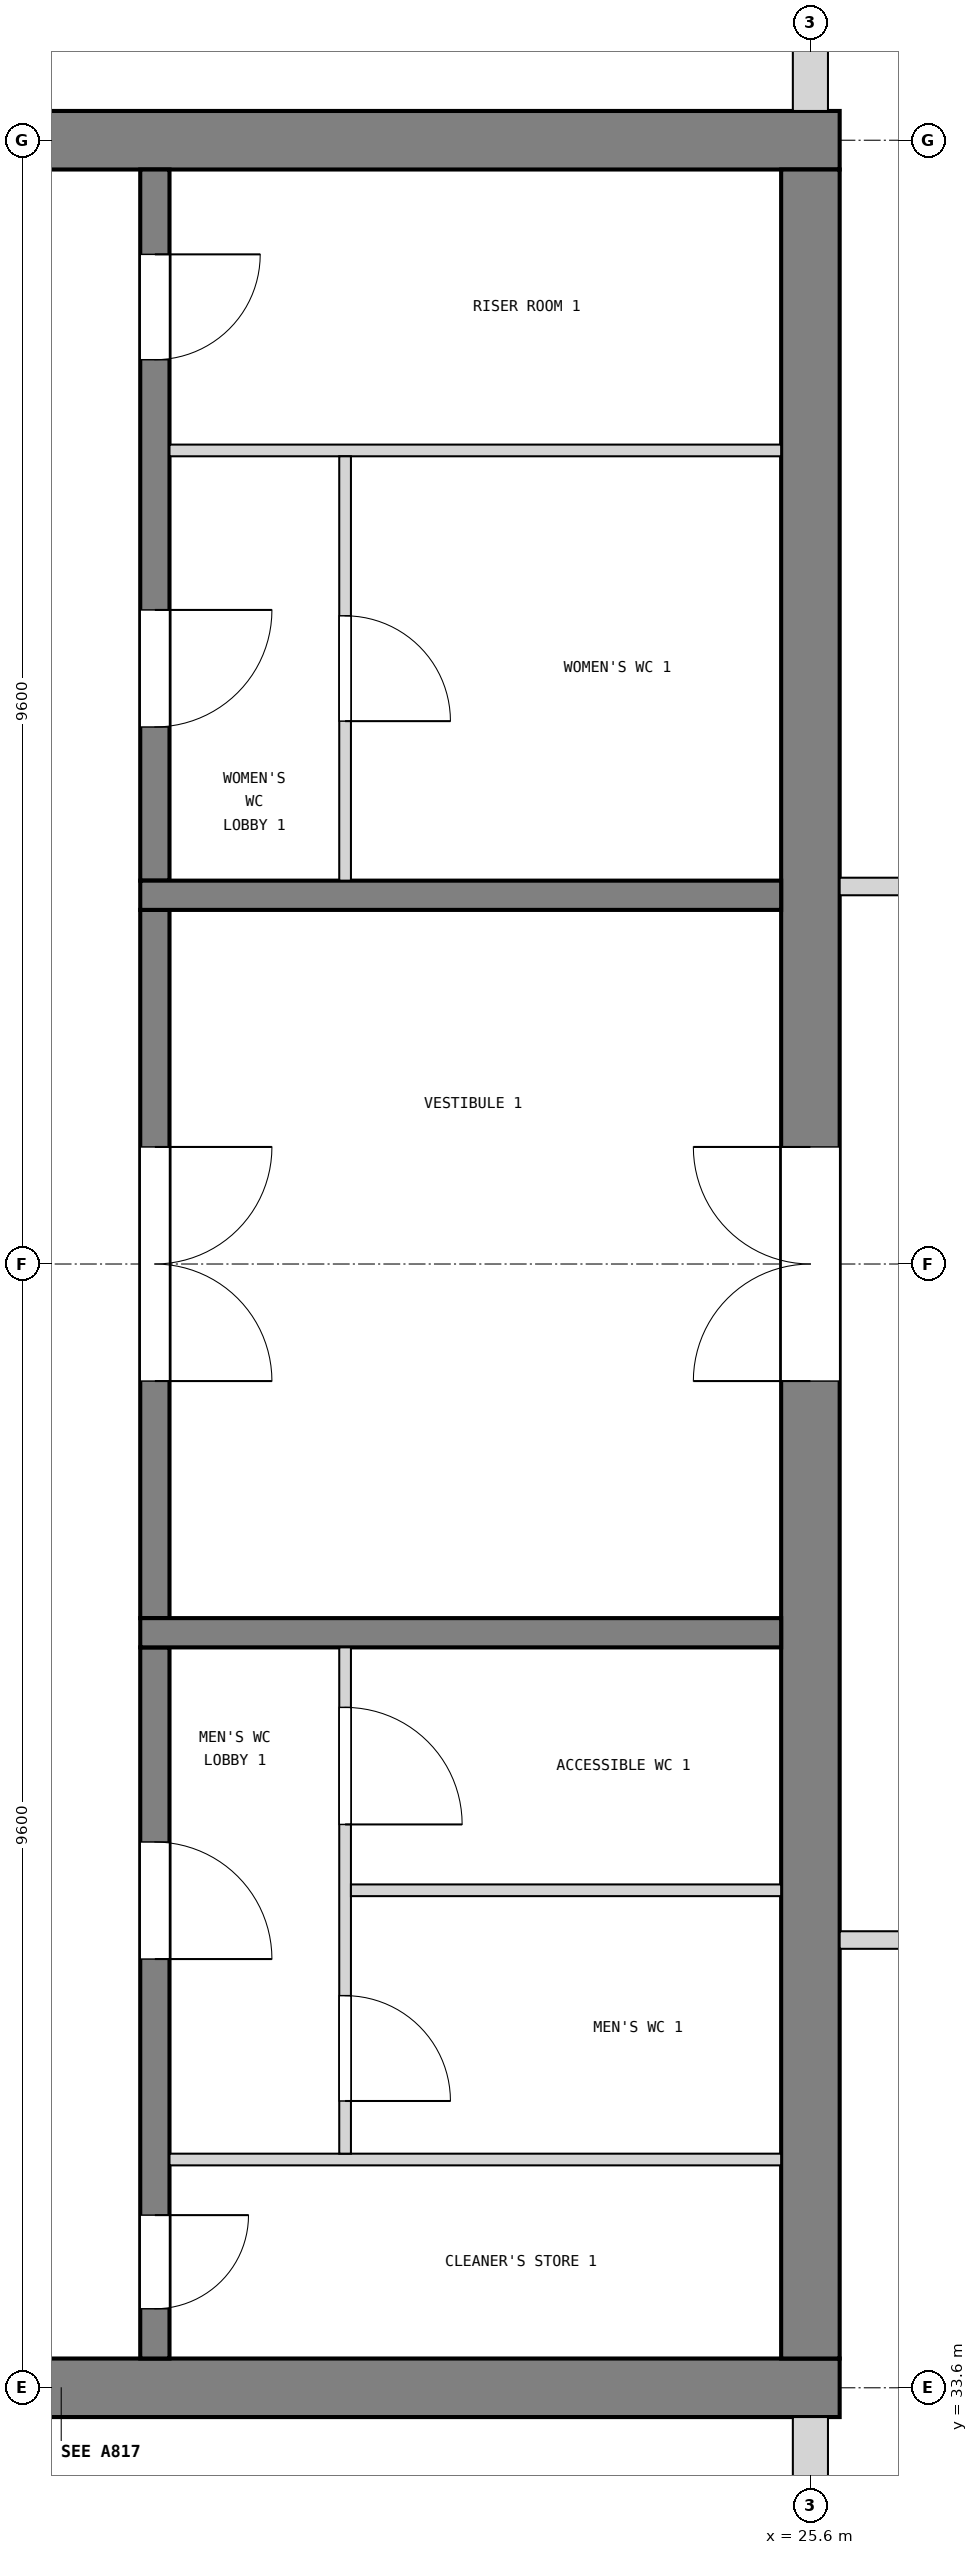
"""IFC4 building model, lengths in metres.
Left out: names, types, materials, properties, quantities, classifications, styles, units other than length and angle.
Written with IfcOpenShell. Run it as: python <this file> out.ifc"""

import sys

from ifc_helpers import new_model, si_unit, direction, frame, frame_2d, origin, place, context, subcontext, project, spatial, rectangle, extrude, element, fill, save


model = new_model("IFC4")
c1 = context("Model", 3, precision=1e-05, world=origin(), true_north=direction((0.0, 1.0)))
c2 = subcontext(c1, "Body", "Model", "MODEL_VIEW")
j1 = project(units=[si_unit("LENGTHUNIT", "METRE"), si_unit("PLANEANGLEUNIT", "RADIAN")], contexts=[c1])
p1 = place(None, origin())
s1 = spatial("IfcSite", under=j1, at=p1, CompositionType="ELEMENT")
p2 = place(p1, origin())
s2 = spatial("IfcBuilding", under=s1, at=p2, CompositionType="ELEMENT")
p3 = place(p2, frame((0.0, 0.0, 60.0)))
s3 = spatial("IfcBuildingStorey", under=s2, at=p3, CompositionType="ELEMENT", Elevation=60.0)
p4 = place(p3, frame((12.55, 52.8, 0.0), z_axis=(0.0, 0.0, 1.0), x_axis=(1.0, 0.0, 0.0)))
e1 = element("IfcWall", 1, at=p4, inside=s3, PredefinedType="SHEAR", context=c2, shape_type="SweptSolid", body=[
    extrude(rectangle(XDim=13.3, YDim=0.5, at=frame_2d((6.65, 0.0))), origin(), (0.0, 0.0, 1.0), 4.2),
])
p5 = place(p4, frame((1.85, 0.0, 1.0)))
e2 = element("IfcOpeningElement", 2, at=p5, cuts=e1, PredefinedType="OPENING", context=c2, shape_type="SweptSolid", body=[
    extrude(rectangle(XDim=0.4, YDim=2.0, at=frame_2d((0.2, 1.0))), frame((0.0, 0.26, 0.0), z_axis=(0.0, -1.0, 0.0), x_axis=(1.0, 0.0, 0.0)), (0.0, 0.0, 1.0), 0.52),
])
p6 = place(p3, frame((12.55, 33.6, 0.0), z_axis=(0.0, 0.0, 1.0), x_axis=(1.0, 0.0, 0.0)))
e3 = element("IfcWall", 3, at=p6, inside=s3, PredefinedType="SHEAR", context=c2, shape_type="SweptSolid", body=[
    extrude(rectangle(XDim=13.3, YDim=0.5, at=frame_2d((6.65, 0.0))), origin(), (0.0, 0.0, 1.0), 4.2),
])
p7 = place(p6, frame((1.85, 0.0, 1.0)))
e4 = element("IfcOpeningElement", 4, at=p7, cuts=e3, PredefinedType="OPENING", context=c2, shape_type="SweptSolid", body=[
    extrude(rectangle(XDim=0.4, YDim=2.0, at=frame_2d((0.2, 1.0))), frame((0.0, 0.26, 0.0), z_axis=(0.0, -1.0, 0.0), x_axis=(1.0, 0.0, 0.0)), (0.0, 0.0, 1.0), 0.52),
])
p8 = place(p3, frame((25.6, 33.85, 0.0), z_axis=(0.0, 0.0, 1.0), x_axis=(0.0, 1.0, 0.0)))
e5 = element("IfcWall", 5, at=p8, inside=s3, PredefinedType="SHEAR", context=c2, shape_type="SweptSolid", body=[
    extrude(rectangle(XDim=18.7, YDim=0.5, at=frame_2d((9.35, 0.0))), origin(), (0.0, 0.0, 1.0), 4.2),
])
p9 = place(p8, frame((8.35, 0.0, 0.0)))
e6 = element("IfcOpeningElement", 6, at=p9, cuts=e5, PredefinedType="OPENING", context=c2, shape_type="SweptSolid", body=[
    extrude(rectangle(XDim=2.0, YDim=2.1, at=frame_2d((1.0, 1.05))), frame((0.0, 0.26, 0.0), z_axis=(0.0, -1.0, 0.0), x_axis=(1.0, 0.0, 0.0)), (0.0, 0.0, 1.0), 0.52),
])
p10 = place(p3, frame((25.6, 31.0, 0.0), z_axis=(0.0, 0.0, 1.0), x_axis=(0.0, 1.0, 0.0)))
e7 = element("IfcWall", 7, at=p10, inside=s3, PredefinedType="SOLIDWALL", context=c2, shape_type="SweptSolid", body=[
    extrude(rectangle(XDim=2.35, YDim=0.3, at=frame_2d((1.175, 0.0))), origin(), (0.0, 0.0, 1.0), 3.1),
])
p11 = place(p3, frame((25.6, 53.05, 0.0), z_axis=(0.0, 0.0, 1.0), x_axis=(0.0, 1.0, 0.0)))
e8 = element("IfcWall", 8, at=p11, inside=s3, PredefinedType="SOLIDWALL", context=c2, shape_type="SweptSolid", body=[
    extrude(rectangle(XDim=2.35, YDim=0.3, at=frame_2d((1.175, 0.0))), origin(), (0.0, 0.0, 1.0), 3.1),
])
p12 = place(p3, frame((20.0, 33.85, 0.0), z_axis=(0.0, 0.0, 1.0), x_axis=(0.0, 1.0, 0.0)))
e9 = element("IfcWall", 9, at=p12, inside=s3, PredefinedType="SOLIDWALL", context=c2, shape_type="SweptSolid", body=[
    extrude(rectangle(XDim=6.075, YDim=0.25, at=frame_2d((3.038, 0.0))), origin(), (0.0, 0.0, 1.0), 3.9),
])
p13 = place(p12, frame((0.425, 0.0, 0.0)))
e10 = element("IfcOpeningElement", 10, at=p13, cuts=e9, PredefinedType="OPENING", context=c2, shape_type="SweptSolid", body=[
    extrude(rectangle(XDim=0.8, YDim=2.1, at=frame_2d((0.4, 1.05))), frame((0.0, 0.135, 0.0), z_axis=(0.0, -1.0, 0.0), x_axis=(1.0, 0.0, 0.0)), (0.0, 0.0, 1.0), 0.27),
])
p14 = place(p12, frame((3.413, 0.0, 0.0)))
e11 = element("IfcOpeningElement", 11, at=p14, cuts=e9, PredefinedType="OPENING", context=c2, shape_type="SweptSolid", body=[
    extrude(rectangle(XDim=1.0, YDim=2.1, at=frame_2d((0.5, 1.05))), frame((0.0, 0.135, 0.0), z_axis=(0.0, -1.0, 0.0), x_axis=(1.0, 0.0, 0.0)), (0.0, 0.0, 1.0), 0.27),
])
p15 = place(p3, frame((20.0, 40.175, 0.0), z_axis=(0.0, 0.0, 1.0), x_axis=(0.0, 1.0, 0.0)))
e12 = element("IfcWall", 12, at=p15, inside=s3, PredefinedType="SOLIDWALL", context=c2, shape_type="SweptSolid", body=[
    extrude(rectangle(XDim=6.05, YDim=0.25, at=frame_2d((3.025, 0.0))), origin(), (0.0, 0.0, 1.0), 3.9),
])
p16 = place(p15, frame((2.025, 0.0, 0.0)))
e13 = element("IfcOpeningElement", 13, at=p16, cuts=e12, PredefinedType="OPENING", context=c2, shape_type="SweptSolid", body=[
    extrude(rectangle(XDim=2.0, YDim=2.1, at=frame_2d((1.0, 1.05))), frame((0.0, 0.135, 0.0), z_axis=(0.0, -1.0, 0.0), x_axis=(1.0, 0.0, 0.0)), (0.0, 0.0, 1.0), 0.27),
])
p17 = place(p3, frame((20.0, 46.475, 0.0), z_axis=(0.0, 0.0, 1.0), x_axis=(0.0, 1.0, 0.0)))
e14 = element("IfcWall", 14, at=p17, inside=s3, PredefinedType="SOLIDWALL", context=c2, shape_type="SweptSolid", body=[
    extrude(rectangle(XDim=6.075, YDim=0.25, at=frame_2d((3.038, 0.0))), origin(), (0.0, 0.0, 1.0), 3.9),
])
p18 = place(p17, frame((1.312, 0.0, 0.0)))
e15 = element("IfcOpeningElement", 15, at=p18, cuts=e14, PredefinedType="OPENING", context=c2, shape_type="SweptSolid", body=[
    extrude(rectangle(XDim=1.0, YDim=2.1, at=frame_2d((0.5, 1.05))), frame((0.0, 0.135, 0.0), z_axis=(0.0, -1.0, 0.0), x_axis=(1.0, 0.0, 0.0)), (0.0, 0.0, 1.0), 0.27),
])
p19 = place(p17, frame((4.45, 0.0, 0.0)))
e16 = element("IfcOpeningElement", 16, at=p19, cuts=e14, PredefinedType="OPENING", context=c2, shape_type="SweptSolid", body=[
    extrude(rectangle(XDim=0.9, YDim=2.1, at=frame_2d((0.45, 1.05))), frame((0.0, 0.135, 0.0), z_axis=(0.0, -1.0, 0.0), x_axis=(1.0, 0.0, 0.0)), (0.0, 0.0, 1.0), 0.27),
])
for number, where, z_axis, x_axis in (
    (17, (19.875, 40.05, 0.0), (0.0, 0.0, 1.0), (1.0, 0.0, 0.0)),
    (18, (19.875, 46.35, 0.0), (0.0, 0.0, 1.0), (1.0, 0.0, 0.0)),
):
    element("IfcWall", number, at=place(p3, frame(where, z_axis=z_axis, x_axis=x_axis)), inside=s3, PredefinedType="SOLIDWALL", context=c2, shape_type="SweptSolid", body=[
        extrude(rectangle(XDim=5.475, YDim=0.25, at=frame_2d((2.738, 0.0))), origin(), (0.0, 0.0, 1.0), 3.9),
    ])
p20 = place(p3, frame((20.125, 35.55, 0.0), z_axis=(0.0, 0.0, 1.0), x_axis=(1.0, 0.0, 0.0)))
e19 = element("IfcWall", 19, at=p20, inside=s3, PredefinedType="PARTITIONING", context=c2, shape_type="SweptSolid", body=[
    extrude(rectangle(XDim=5.225, YDim=0.1, at=frame_2d((2.613, 0.0))), origin(), (0.0, 0.0, 1.0), 3.9),
])
p21 = place(p3, frame((21.625, 35.6, 0.0), z_axis=(0.0, 0.0, 1.0), x_axis=(0.0, 1.0, 0.0)))
e20 = element("IfcWall", 20, at=p21, inside=s3, PredefinedType="PARTITIONING", context=c2, shape_type="SweptSolid", body=[
    extrude(rectangle(XDim=4.325, YDim=0.1, at=frame_2d((2.163, 0.0))), origin(), (0.0, 0.0, 1.0), 3.9),
])
p22 = place(p21, frame((0.45, 0.0, 0.0)))
e21 = element("IfcOpeningElement", 21, at=p22, cuts=e20, PredefinedType="OPENING", context=c2, shape_type="SweptSolid", body=[
    extrude(rectangle(XDim=0.9, YDim=2.1, at=frame_2d((0.45, 1.05))), frame((0.0, 0.06, 0.0), z_axis=(0.0, -1.0, 0.0), x_axis=(1.0, 0.0, 0.0)), (0.0, 0.0, 1.0), 0.12),
])
p23 = place(p21, frame((2.812, 0.0, 0.0)))
e22 = element("IfcOpeningElement", 22, at=p23, cuts=e20, PredefinedType="OPENING", context=c2, shape_type="SweptSolid", body=[
    extrude(rectangle(XDim=1.0, YDim=2.1, at=frame_2d((0.5, 1.05))), frame((0.0, 0.06, 0.0), z_axis=(0.0, -1.0, 0.0), x_axis=(1.0, 0.0, 0.0)), (0.0, 0.0, 1.0), 0.12),
])
p24 = place(p3, frame((21.675, 37.85, 0.0), z_axis=(0.0, 0.0, 1.0), x_axis=(1.0, 0.0, 0.0)))
e23 = element("IfcWall", 23, at=p24, inside=s3, PredefinedType="PARTITIONING", context=c2, shape_type="SweptSolid", body=[
    extrude(rectangle(XDim=3.675, YDim=0.1, at=frame_2d((1.837, 0.0))), origin(), (0.0, 0.0, 1.0), 3.9),
])
p25 = place(p3, frame((20.125, 50.15, 0.0), z_axis=(0.0, 0.0, 1.0), x_axis=(1.0, 0.0, 0.0)))
e24 = element("IfcWall", 24, at=p25, inside=s3, PredefinedType="PARTITIONING", context=c2, shape_type="SweptSolid", body=[
    extrude(rectangle(XDim=5.225, YDim=0.1, at=frame_2d((2.613, 0.0))), origin(), (0.0, 0.0, 1.0), 3.9),
])
p26 = place(p3, frame((21.625, 46.475, 0.0), z_axis=(0.0, 0.0, 1.0), x_axis=(0.0, 1.0, 0.0)))
e25 = element("IfcWall", 25, at=p26, inside=s3, PredefinedType="PARTITIONING", context=c2, shape_type="SweptSolid", body=[
    extrude(rectangle(XDim=3.625, YDim=0.1, at=frame_2d((1.812, 0.0))), origin(), (0.0, 0.0, 1.0), 3.9),
])
p27 = place(p26, frame((1.363, 0.0, 0.0)))
e26 = element("IfcOpeningElement", 26, at=p27, cuts=e25, PredefinedType="OPENING", context=c2, shape_type="SweptSolid", body=[
    extrude(rectangle(XDim=0.9, YDim=2.1, at=frame_2d((0.45, 1.05))), frame((0.0, 0.06, 0.0), z_axis=(0.0, -1.0, 0.0), x_axis=(1.0, 0.0, 0.0)), (0.0, 0.0, 1.0), 0.12),
])
p28 = place(p3, frame((25.85, 37.425, 0.0), z_axis=(0.0, 0.0, 1.0), x_axis=(1.0, 0.0, 0.0)))
e27 = element("IfcWall", 27, at=p28, inside=s3, PredefinedType="PARTITIONING", context=c2, shape_type="SweptSolid", body=[
    extrude(rectangle(XDim=12.37, YDim=0.15, at=frame_2d((6.185, 0.0))), origin(), (0.0, 0.0, 1.0), 3.9),
])
p29 = place(p28, frame((2.15, 0.0, 0.0)))
e28 = element("IfcOpeningElement", 28, at=p29, cuts=e27, PredefinedType="OPENING", context=c2, shape_type="SweptSolid", body=[
    extrude(rectangle(XDim=1.8, YDim=2.1, at=frame_2d((0.9, 1.05))), frame((0.0, 0.085, 0.0), z_axis=(0.0, -1.0, 0.0), x_axis=(1.0, 0.0, 0.0)), (0.0, 0.0, 1.0), 0.17),
])
p30 = place(p28, frame((8.3, 0.0, 0.0)))
e29 = element("IfcOpeningElement", 29, at=p30, cuts=e27, PredefinedType="OPENING", context=c2, shape_type="SweptSolid", body=[
    extrude(rectangle(XDim=1.8, YDim=2.1, at=frame_2d((0.9, 1.05))), frame((0.0, 0.085, 0.0), z_axis=(0.0, -1.0, 0.0), x_axis=(1.0, 0.0, 0.0)), (0.0, 0.0, 1.0), 0.17),
])
p31 = place(p3, frame((25.85, 46.425, 0.0), z_axis=(0.0, 0.0, 1.0), x_axis=(1.0, 0.0, 0.0)))
e30 = element("IfcWall", 30, at=p31, inside=s3, PredefinedType="PARTITIONING", context=c2, shape_type="SweptSolid", body=[
    extrude(rectangle(XDim=5.97, YDim=0.15, at=frame_2d((2.985, 0.0))), origin(), (0.0, 0.0, 1.0), 3.9),
])
p32 = place(p31, frame((2.45, 0.0, 0.0)))
e31 = element("IfcOpeningElement", 31, at=p32, cuts=e30, PredefinedType="OPENING", context=c2, shape_type="SweptSolid", body=[
    extrude(rectangle(XDim=1.0, YDim=2.1, at=frame_2d((0.5, 1.05))), frame((0.0, 0.085, 0.0), z_axis=(0.0, -1.0, 0.0), x_axis=(1.0, 0.0, 0.0)), (0.0, 0.0, 1.0), 0.17),
])
p33 = place(p16, frame((2.0, 0.0, 0.0), z_axis=(0.0, 0.0, 1.0), x_axis=(-1.0, 0.0, 0.0)))
e32 = element("IfcDoor", 32, at=p33, inside=s3, OperationType="DOUBLE_DOOR_SINGLE_SWING", PredefinedType="DOOR", context=c2, shape_type="SweptSolid", body=[
    extrude(rectangle(XDim=2.0, YDim=2.1, at=frame_2d((1.0, 1.05))), frame((0.0, 0.025, 0.0), z_axis=(0.0, -1.0, 0.0), x_axis=(1.0, 0.0, 0.0)), (0.0, 0.0, 1.0), 0.05),
])
fill(e13, e32)
p34 = place(p9, origin())
e33 = element("IfcDoor", 33, at=p34, inside=s3, OperationType="DOUBLE_DOOR_SINGLE_SWING", PredefinedType="DOOR", context=c2, shape_type="SweptSolid", body=[
    extrude(rectangle(XDim=2.0, YDim=2.1, at=frame_2d((1.0, 1.05))), frame((0.0, 0.025, 0.0), z_axis=(0.0, -1.0, 0.0), x_axis=(1.0, 0.0, 0.0)), (0.0, 0.0, 1.0), 0.05),
])
fill(e6, e33)
p35 = place(p13, frame((0.8, 0.0, 0.0), z_axis=(0.0, 0.0, 1.0), x_axis=(-1.0, 0.0, 0.0)))
e34 = element("IfcDoor", 34, at=p35, inside=s3, OperationType="SINGLE_SWING_LEFT", PredefinedType="DOOR", context=c2, shape_type="SweptSolid", body=[
    extrude(rectangle(XDim=0.8, YDim=2.1, at=frame_2d((0.4, 1.05))), frame((0.0, 0.025, 0.0), z_axis=(0.0, -1.0, 0.0), x_axis=(1.0, 0.0, 0.0)), (0.0, 0.0, 1.0), 0.05),
])
fill(e10, e34)
p36 = place(p14, frame((1.0, 0.0, 0.0), z_axis=(0.0, 0.0, 1.0), x_axis=(-1.0, 0.0, 0.0)))
e35 = element("IfcDoor", 35, at=p36, inside=s3, OperationType="SINGLE_SWING_RIGHT", PredefinedType="DOOR", context=c2, shape_type="SweptSolid", body=[
    extrude(rectangle(XDim=1.0, YDim=2.1, at=frame_2d((0.5, 1.05))), frame((0.0, 0.025, 0.0), z_axis=(0.0, -1.0, 0.0), x_axis=(1.0, 0.0, 0.0)), (0.0, 0.0, 1.0), 0.05),
])
fill(e11, e35)
p37 = place(p22, frame((0.9, 0.0, 0.0), z_axis=(0.0, 0.0, 1.0), x_axis=(-1.0, 0.0, 0.0)))
e36 = element("IfcDoor", 36, at=p37, inside=s3, OperationType="SINGLE_SWING_RIGHT", PredefinedType="DOOR", context=c2, shape_type="SweptSolid", body=[
    extrude(rectangle(XDim=0.9, YDim=2.1, at=frame_2d((0.45, 1.05))), frame((0.0, 0.025, 0.0), z_axis=(0.0, -1.0, 0.0), x_axis=(1.0, 0.0, 0.0)), (0.0, 0.0, 1.0), 0.05),
])
fill(e21, e36)
p38 = place(p23, frame((1.0, 0.0, 0.0), z_axis=(0.0, 0.0, 1.0), x_axis=(-1.0, 0.0, 0.0)))
e37 = element("IfcDoor", 37, at=p38, inside=s3, OperationType="SINGLE_SWING_RIGHT", PredefinedType="DOOR", context=c2, shape_type="SweptSolid", body=[
    extrude(rectangle(XDim=1.0, YDim=2.1, at=frame_2d((0.5, 1.05))), frame((0.0, 0.025, 0.0), z_axis=(0.0, -1.0, 0.0), x_axis=(1.0, 0.0, 0.0)), (0.0, 0.0, 1.0), 0.05),
])
fill(e22, e37)
p39 = place(p18, frame((1.0, 0.0, 0.0), z_axis=(0.0, 0.0, 1.0), x_axis=(-1.0, 0.0, 0.0)))
e38 = element("IfcDoor", 38, at=p39, inside=s3, OperationType="SINGLE_SWING_LEFT", PredefinedType="DOOR", context=c2, shape_type="SweptSolid", body=[
    extrude(rectangle(XDim=1.0, YDim=2.1, at=frame_2d((0.5, 1.05))), frame((0.0, 0.025, 0.0), z_axis=(0.0, -1.0, 0.0), x_axis=(1.0, 0.0, 0.0)), (0.0, 0.0, 1.0), 0.05),
])
fill(e15, e38)
p40 = place(p27, frame((0.9, 0.0, 0.0), z_axis=(0.0, 0.0, 1.0), x_axis=(-1.0, 0.0, 0.0)))
e39 = element("IfcDoor", 39, at=p40, inside=s3, OperationType="SINGLE_SWING_RIGHT", PredefinedType="DOOR", context=c2, shape_type="SweptSolid", body=[
    extrude(rectangle(XDim=0.9, YDim=2.1, at=frame_2d((0.45, 1.05))), frame((0.0, 0.025, 0.0), z_axis=(0.0, -1.0, 0.0), x_axis=(1.0, 0.0, 0.0)), (0.0, 0.0, 1.0), 0.05),
])
fill(e26, e39)
p41 = place(p19, frame((0.9, 0.0, 0.0), z_axis=(0.0, 0.0, 1.0), x_axis=(-1.0, 0.0, 0.0)))
e40 = element("IfcDoor", 40, at=p41, inside=s3, OperationType="SINGLE_SWING_LEFT", PredefinedType="DOOR", context=c2, shape_type="SweptSolid", body=[
    extrude(rectangle(XDim=0.9, YDim=2.1, at=frame_2d((0.45, 1.05))), frame((0.0, 0.025, 0.0), z_axis=(0.0, -1.0, 0.0), x_axis=(1.0, 0.0, 0.0)), (0.0, 0.0, 1.0), 0.05),
])
fill(e16, e40)
save(model, sys.argv[1])
